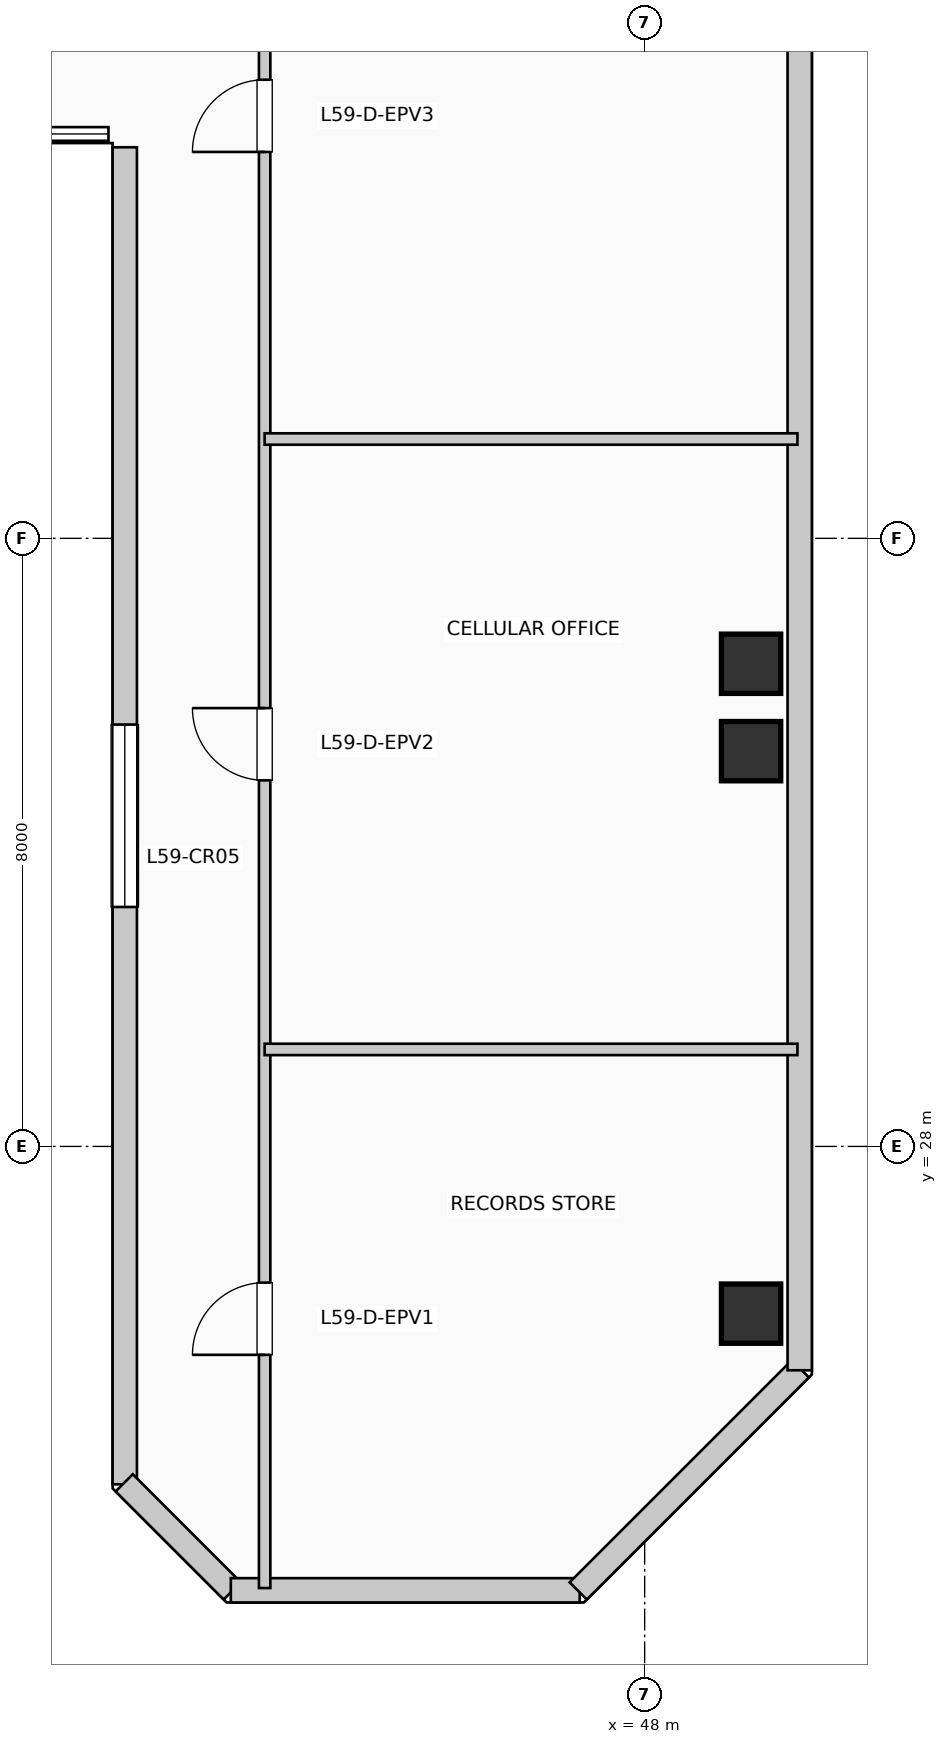
"""IFC4 building model, lengths in metres.
Left out: names, types, materials, properties, quantities, classifications, styles, units other than length and angle.
Written with IfcOpenShell. Run it as: python <this file> out.ifc"""

import sys

from ifc_helpers import new_model, si_unit, direction, frame, frame_2d, origin, origin_2d, place, context, subcontext, project, spatial, rectangle, extrude, element, fill, save


model = new_model("IFC4")
c1 = context("Model", 3, precision=1e-05, world=origin(), true_north=direction((0.0, 1.0)))
c2 = subcontext(c1, "Body", "Model", "MODEL_VIEW")
j1 = project(units=[si_unit("LENGTHUNIT", "METRE"), si_unit("PLANEANGLEUNIT", "RADIAN")], contexts=[c1])
p1 = place(None, origin())
s1 = spatial("IfcSite", under=j1, at=p1, CompositionType="ELEMENT")
p2 = place(p1, origin())
s2 = spatial("IfcBuilding", under=s1, at=p2, CompositionType="ELEMENT")
p3 = place(p2, frame((0.0, 0.0, 243.54)))
s3 = spatial("IfcBuildingStorey", under=s2, at=p3, CompositionType="ELEMENT", Elevation=243.54)
for number, where, z_axis, x_axis in (
    (1, (49.4, 25.8, 0.0), (0.0, 0.0, 1.0), (1.0, 0.0, 0.0)),
    (2, (49.4, 33.2, 0.0), (0.0, 0.0, 1.0), (1.0, 0.0, 0.0)),
    (3, (49.4, 34.35, 0.0), (0.0, 0.0, 1.0), (1.0, 0.0, 0.0)),
):
    element("IfcColumn", number, at=place(p3, frame(where, z_axis=z_axis, x_axis=x_axis)), inside=s3, PredefinedType="COLUMN", context=c2, shape_type="SweptSolid", body=[
        extrude(rectangle(XDim=0.78, YDim=0.78, at=origin_2d()), origin(), (0.0, 0.0, 1.0), 3.96),
    ])
p4 = place(p3, frame((41.16, 41.145, 0.0), z_axis=(0.0, 0.0, 1.0), x_axis=(0.0, -1.0, 0.0)))
e4 = element("IfcWall", 4, at=p4, inside=s3, PredefinedType="SOLIDWALL", context=c2, shape_type="SweptSolid", body=[
    extrude(rectangle(XDim=17.59, YDim=0.32, at=frame_2d((8.795, 0.0))), origin(), (0.0, 0.0, 1.0), 3.71),
])
p5 = place(p4, frame((7.595, 0.0, 0.85)))
e5 = element("IfcOpeningElement", 5, at=p5, cuts=e4, PredefinedType="OPENING", context=c2, shape_type="SweptSolid", body=[
    extrude(rectangle(XDim=2.4, YDim=2.05, at=frame_2d((1.2, 1.025))), frame((0.0, 0.17, 0.0), z_axis=(0.0, -1.0, 0.0), x_axis=(1.0, 0.0, 0.0)), (0.0, 0.0, 1.0), 0.34),
])
p6 = place(p3, frame((41.152, 23.574, 0.0), z_axis=(0.0, 0.0, 1.0), x_axis=(0.707106781187, -0.707106781187, 0.0)))
e6 = element("IfcWall", 6, at=p6, inside=s3, PredefinedType="SOLIDWALL", context=c2, shape_type="SweptSolid", body=[
    extrude(rectangle(XDim=2.011, YDim=0.32, at=frame_2d((1.006, 0.0))), origin(), (0.0, 0.0, 1.0), 3.71),
])
p7 = place(p3, frame((42.555, 22.16, 0.0), z_axis=(0.0, 0.0, 1.0), x_axis=(1.0, 0.0, 0.0)))
e7 = element("IfcWall", 7, at=p7, inside=s3, PredefinedType="SOLIDWALL", context=c2, shape_type="SweptSolid", body=[
    extrude(rectangle(XDim=4.59, YDim=0.32, at=frame_2d((2.295, 0.0))), origin(), (0.0, 0.0, 1.0), 3.71),
])
p8 = place(p3, frame((47.126, 22.152, 0.0), z_axis=(0.0, 0.0, 1.0), x_axis=(0.707136318428, 0.707077242712, 0.0)))
e8 = element("IfcWall", 8, at=p8, inside=s3, PredefinedType="SOLIDWALL", context=c2, shape_type="SweptSolid", body=[
    extrude(rectangle(XDim=4.133, YDim=0.32, at=frame_2d((2.066, 0.0))), origin(), (0.0, 0.0, 1.0), 3.71),
])
p9 = place(p3, frame((50.04, 25.055, 0.0), z_axis=(0.0, 0.0, 1.0), x_axis=(0.0, 1.0, 0.0)))
e9 = element("IfcWall", 9, at=p9, inside=s3, PredefinedType="SOLIDWALL", context=c2, shape_type="SweptSolid", body=[
    extrude(rectangle(XDim=17.89, YDim=0.32, at=frame_2d((8.945, 0.0))), origin(), (0.0, 0.0, 1.0), 3.71),
])
p10 = place(p3, frame((43.0, 22.19, 0.0), z_axis=(0.0, 0.0, 1.0), x_axis=(0.0, 1.0, 0.0)))
e10 = element("IfcWall", 10, at=p10, inside=s3, PredefinedType="PARTITIONING", context=c2, shape_type="SweptSolid", body=[
    extrude(rectangle(XDim=23.62, YDim=0.15, at=frame_2d((11.81, 0.0))), origin(), (0.0, 0.0, 1.0), 3.71),
])
p11 = place(p10, frame((3.068, 0.0, 0.0)))
e11 = element("IfcOpeningElement", 11, at=p11, cuts=e10, PredefinedType="OPENING", context=c2, shape_type="SweptSolid", body=[
    extrude(rectangle(XDim=0.95, YDim=2.15, at=frame_2d((0.475, 1.075))), frame((0.0, 0.085, 0.0), z_axis=(0.0, -1.0, 0.0), x_axis=(1.0, 0.0, 0.0)), (0.0, 0.0, 1.0), 0.17),
])
p12 = place(p10, frame((10.626, 0.0, 0.0)))
e12 = element("IfcOpeningElement", 12, at=p12, cuts=e10, PredefinedType="OPENING", context=c2, shape_type="SweptSolid", body=[
    extrude(rectangle(XDim=0.95, YDim=2.15, at=frame_2d((0.475, 1.075))), frame((0.0, 0.085, 0.0), z_axis=(0.0, -1.0, 0.0), x_axis=(1.0, 0.0, 0.0)), (0.0, 0.0, 1.0), 0.17),
])
p13 = place(p10, frame((18.893, 0.0, 0.0)))
e13 = element("IfcOpeningElement", 13, at=p13, cuts=e10, PredefinedType="OPENING", context=c2, shape_type="SweptSolid", body=[
    extrude(rectangle(XDim=0.95, YDim=2.15, at=frame_2d((0.475, 1.075))), frame((0.0, 0.085, 0.0), z_axis=(0.0, -1.0, 0.0), x_axis=(1.0, 0.0, 0.0)), (0.0, 0.0, 1.0), 0.17),
])
for number, where, z_axis, x_axis in (
    (14, (43.0, 29.276, 0.0), (0.0, 0.0, 1.0), (1.0, 0.0, 0.0)),
    (15, (43.0, 37.307, 0.0), (0.0, 0.0, 1.0), (1.0, 0.0, 0.0)),
):
    element("IfcWall", number, at=place(p3, frame(where, z_axis=z_axis, x_axis=x_axis)), inside=s3, PredefinedType="PARTITIONING", context=c2, shape_type="SweptSolid", body=[
        extrude(rectangle(XDim=7.01, YDim=0.15, at=frame_2d((3.505, 0.0))), origin(), (0.0, 0.0, 1.0), 3.71),
    ])
p14 = place(p5, origin())
e16 = element("IfcWindow", 16, at=p14, inside=s3, PartitioningType="SINGLE_PANEL", PredefinedType="WINDOW", context=c2, shape_type="SweptSolid", body=[
    extrude(rectangle(XDim=2.4, YDim=2.05, at=frame_2d((1.2, 1.025))), frame((0.0, 0.03, 0.0), z_axis=(0.0, -1.0, 0.0), x_axis=(1.0, 0.0, 0.0)), (0.0, 0.0, 1.0), 0.06),
])
fill(e5, e16)
p15 = place(p11, origin())
e17 = element("IfcDoor", 17, at=p15, inside=s3, OperationType="SINGLE_SWING_LEFT", PredefinedType="DOOR", context=c2, shape_type="SweptSolid", body=[
    extrude(rectangle(XDim=0.95, YDim=2.15, at=frame_2d((0.475, 1.075))), frame((0.0, 0.025, 0.0), z_axis=(0.0, -1.0, 0.0), x_axis=(1.0, 0.0, 0.0)), (0.0, 0.0, 1.0), 0.05),
])
fill(e11, e17)
p16 = place(p12, origin())
e18 = element("IfcDoor", 18, at=p16, inside=s3, OperationType="SINGLE_SWING_RIGHT", PredefinedType="DOOR", context=c2, shape_type="SweptSolid", body=[
    extrude(rectangle(XDim=0.95, YDim=2.15, at=frame_2d((0.475, 1.075))), frame((0.0, 0.025, 0.0), z_axis=(0.0, -1.0, 0.0), x_axis=(1.0, 0.0, 0.0)), (0.0, 0.0, 1.0), 0.05),
])
fill(e12, e18)
p17 = place(p13, origin())
e19 = element("IfcDoor", 19, at=p17, inside=s3, OperationType="SINGLE_SWING_LEFT", PredefinedType="DOOR", context=c2, shape_type="SweptSolid", body=[
    extrude(rectangle(XDim=0.95, YDim=2.15, at=frame_2d((0.475, 1.075))), frame((0.0, 0.025, 0.0), z_axis=(0.0, -1.0, 0.0), x_axis=(1.0, 0.0, 0.0)), (0.0, 0.0, 1.0), 0.05),
])
fill(e13, e19)
save(model, sys.argv[1])
